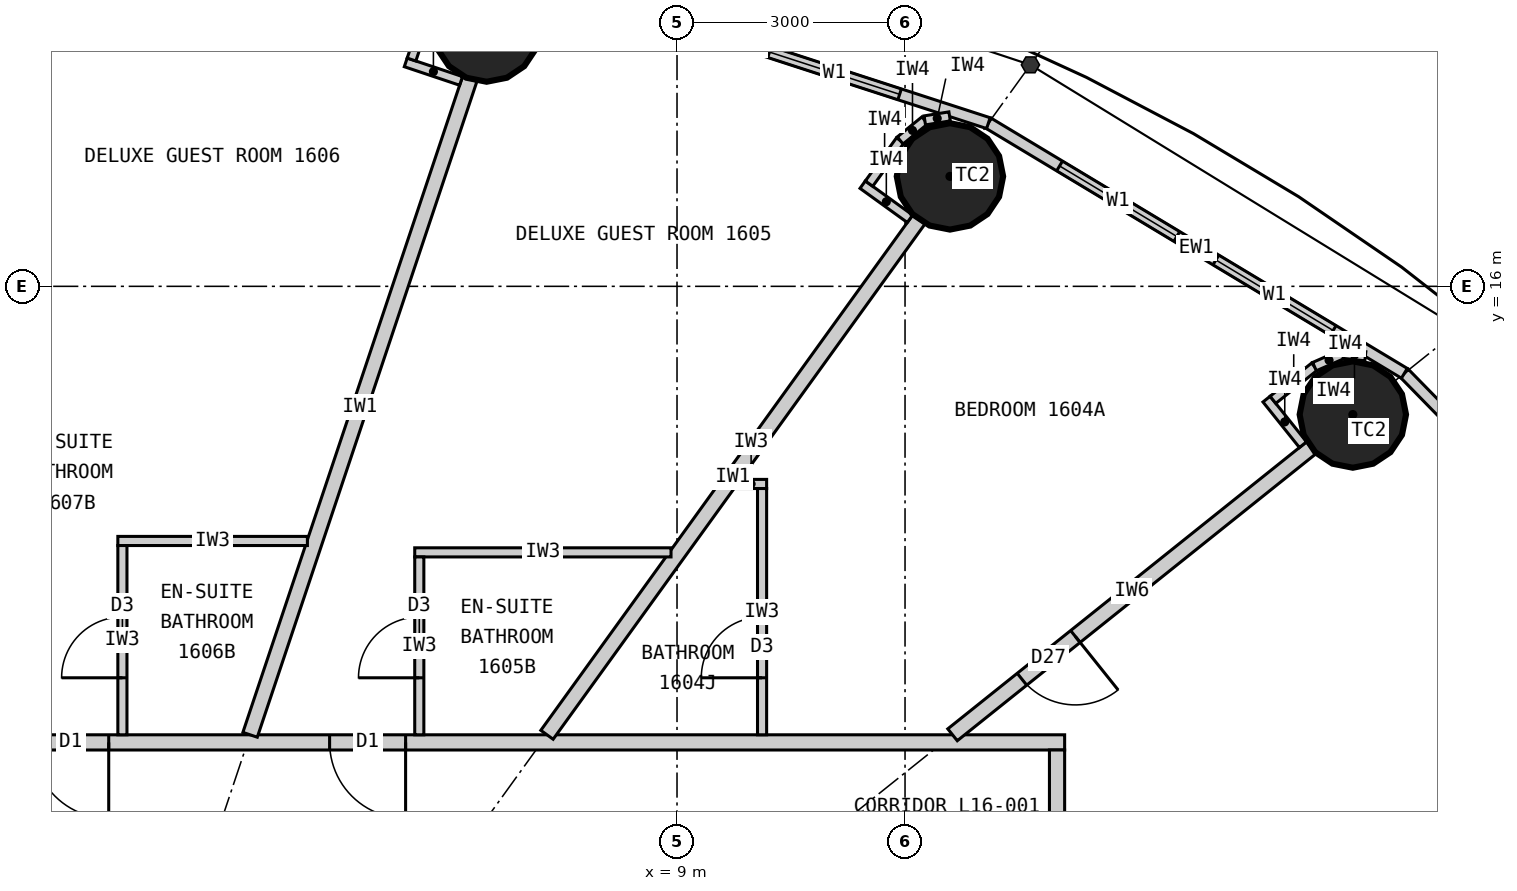
"""IFC4 building model, lengths in metres.
Left out: names, types, materials, properties, quantities, classifications, styles, units other than length and angle.
Written with IfcOpenShell. Run it as: python <this file> out.ifc"""

import sys

from ifc_helpers import new_model, si_unit, direction, frame, frame_2d, origin, origin_2d, place, context, subcontext, project, spatial, rectangle, circle, extrude, element, fill, save


model = new_model("IFC4")
c1 = context("Model", 3, precision=1e-05, world=origin(), true_north=direction((0.0, 1.0)))
c2 = subcontext(c1, "Body", "Model", "MODEL_VIEW")
j1 = project(units=[si_unit("LENGTHUNIT", "METRE"), si_unit("PLANEANGLEUNIT", "RADIAN")], contexts=[c1])
p1 = place(None, origin())
s1 = spatial("IfcSite", under=j1, at=p1, CompositionType="ELEMENT")
p2 = place(p1, origin())
s2 = spatial("IfcBuilding", under=s1, at=p2, CompositionType="ELEMENT")
p3 = place(p2, frame((0.0, 0.0, 67.2)))
s3 = spatial("IfcBuildingStorey", under=s2, at=p3, CompositionType="ELEMENT", Elevation=67.2)
for number, where, z_axis, x_axis in (
    (1, (17.892, 14.313, 0.0), (0.0, 0.0, 1.0), (1.0, 0.0, 0.0)),
    (2, (12.591, 17.447, 0.0), (0.0, 0.0, 1.0), (1.0, 0.0, 0.0)),
    (3, (6.495, 19.391, 0.0), (0.0, 0.0, 1.0), (1.0, 0.0, 0.0)),
):
    element("IfcColumn", number, at=place(p3, frame(where, z_axis=z_axis, x_axis=x_axis)), inside=s3, PredefinedType="COLUMN", context=c2, shape_type="SweptSolid", body=[
        extrude(circle(Radius=0.7, at=origin_2d()), origin(), (0.0, 0.0, 1.0), 3.3),
    ])
p4 = place(p3, frame((22.803, 10.532, 0.0), z_axis=(0.0, 0.0, 1.0), x_axis=(-0.699602905915, 0.714531856557, 0.0)))
e4 = element("IfcWall", 4, at=p4, inside=s3, PredefinedType="ELEMENTEDWALL", context=c2, shape_type="SweptSolid", body=[
    extrude(rectangle(XDim=6.051, YDim=0.15, at=frame_2d((3.025, 0.0))), origin(), (0.0, 0.0, 1.0), 3.12),
])
p5 = place(p4, frame((0.926, 0.0, 0.9)))
e5 = element("IfcOpeningElement", 5, at=p5, cuts=e4, PredefinedType="OPENING", context=c2, shape_type="SweptSolid", body=[
    extrude(rectangle(XDim=1.8, YDim=1.9, at=frame_2d((0.9, 0.95))), frame((0.0, 0.085, 0.0), z_axis=(0.0, -1.0, 0.0), x_axis=(1.0, 0.0, 0.0)), (0.0, 0.0, 1.0), 0.17),
])
p6 = place(p4, frame((3.325, 0.0, 0.9)))
e6 = element("IfcOpeningElement", 6, at=p6, cuts=e4, PredefinedType="OPENING", context=c2, shape_type="SweptSolid", body=[
    extrude(rectangle(XDim=1.8, YDim=1.9, at=frame_2d((0.9, 0.95))), frame((0.0, 0.085, 0.0), z_axis=(0.0, -1.0, 0.0), x_axis=(1.0, 0.0, 0.0)), (0.0, 0.0, 1.0), 0.17),
])
p7 = place(p3, frame((18.57, 14.856, 0.0), z_axis=(0.0, 0.0, 1.0), x_axis=(-0.856983180864, 0.515344377787, 0.0)))
e7 = element("IfcWall", 7, at=p7, inside=s3, PredefinedType="ELEMENTEDWALL", context=c2, shape_type="SweptSolid", body=[
    extrude(rectangle(XDim=6.386, YDim=0.15, at=frame_2d((3.193, 0.0))), origin(), (0.0, 0.0, 1.0), 3.12),
])
p8 = place(p7, frame((1.093, 0.0, 0.9)))
e8 = element("IfcOpeningElement", 8, at=p8, cuts=e7, PredefinedType="OPENING", context=c2, shape_type="SweptSolid", body=[
    extrude(rectangle(XDim=1.8, YDim=1.9, at=frame_2d((0.9, 0.95))), frame((0.0, 0.085, 0.0), z_axis=(0.0, -1.0, 0.0), x_axis=(1.0, 0.0, 0.0)), (0.0, 0.0, 1.0), 0.17),
])
p9 = place(p7, frame((3.493, 0.0, 0.9)))
e9 = element("IfcOpeningElement", 9, at=p9, cuts=e7, PredefinedType="OPENING", context=c2, shape_type="SweptSolid", body=[
    extrude(rectangle(XDim=1.8, YDim=1.9, at=frame_2d((0.9, 0.95))), frame((0.0, 0.085, 0.0), z_axis=(0.0, -1.0, 0.0), x_axis=(1.0, 0.0, 0.0)), (0.0, 0.0, 1.0), 0.17),
])
p10 = place(p3, frame((13.096, 18.147, 0.0), z_axis=(0.0, 0.0, 1.0), x_axis=(-0.951137534625, 0.308767534285, 0.0)))
e10 = element("IfcWall", 10, at=p10, inside=s3, PredefinedType="ELEMENTEDWALL", context=c2, shape_type="SweptSolid", body=[
    extrude(rectangle(XDim=6.655, YDim=0.15, at=frame_2d((3.328, 0.0))), origin(), (0.0, 0.0, 1.0), 3.12),
])
p11 = place(p10, frame((1.228, 0.0, 0.9)))
e11 = element("IfcOpeningElement", 11, at=p11, cuts=e10, PredefinedType="OPENING", context=c2, shape_type="SweptSolid", body=[
    extrude(rectangle(XDim=1.8, YDim=1.9, at=frame_2d((0.9, 0.95))), frame((0.0, 0.085, 0.0), z_axis=(0.0, -1.0, 0.0), x_axis=(1.0, 0.0, 0.0)), (0.0, 0.0, 1.0), 0.17),
])
p12 = place(p10, frame((3.628, 0.0, 0.9)))
e12 = element("IfcOpeningElement", 12, at=p12, cuts=e10, PredefinedType="OPENING", context=c2, shape_type="SweptSolid", body=[
    extrude(rectangle(XDim=1.8, YDim=1.9, at=frame_2d((0.9, 0.95))), frame((0.0, 0.085, 0.0), z_axis=(0.0, -1.0, 0.0), x_axis=(1.0, 0.0, 0.0)), (0.0, 0.0, 1.0), 0.17),
])
p13 = place(p3, frame((-14.1, 10.0, 0.0), z_axis=(0.0, 0.0, 1.0), x_axis=(1.0, 0.0, 0.0)))
e13 = element("IfcWall", 13, at=p13, inside=s3, PredefinedType="PARTITIONING", context=c2, shape_type="SweptSolid", body=[
    extrude(rectangle(XDim=28.2, YDim=0.2, at=frame_2d((14.1, 0.0))), origin(), (0.0, 0.0, 1.0), 3.12),
])
p14 = place(p13, frame((18.529, 0.0, 0.0)))
e14 = element("IfcOpeningElement", 14, at=p14, cuts=e13, PredefinedType="OPENING", context=c2, shape_type="SweptSolid", body=[
    extrude(rectangle(XDim=1.0, YDim=2.2, at=frame_2d((0.5, 1.1))), frame((0.0, 0.11, 0.0), z_axis=(0.0, -1.0, 0.0), x_axis=(1.0, 0.0, 0.0)), (0.0, 0.0, 1.0), 0.22),
])
p15 = place(p13, frame((14.623, 0.0, 0.0)))
e15 = element("IfcOpeningElement", 15, at=p15, cuts=e13, PredefinedType="OPENING", context=c2, shape_type="SweptSolid", body=[
    extrude(rectangle(XDim=1.0, YDim=2.2, at=frame_2d((0.5, 1.1))), frame((0.0, 0.11, 0.0), z_axis=(0.0, -1.0, 0.0), x_axis=(1.0, 0.0, 0.0)), (0.0, 0.0, 1.0), 0.22),
])
p16 = place(p13, frame((11.24, 0.0, 0.0)))
e16 = element("IfcOpeningElement", 16, at=p16, cuts=e13, PredefinedType="OPENING", context=c2, shape_type="SweptSolid", body=[
    extrude(rectangle(XDim=1.0, YDim=2.2, at=frame_2d((0.5, 1.1))), frame((0.0, 0.11, 0.0), z_axis=(0.0, -1.0, 0.0), x_axis=(1.0, 0.0, 0.0)), (0.0, 0.0, 1.0), 0.22),
])
p17 = place(p13, frame((8.671, 0.0, 0.0)))
e17 = element("IfcOpeningElement", 17, at=p17, cuts=e13, PredefinedType="OPENING", context=c2, shape_type="SweptSolid", body=[
    extrude(rectangle(XDim=1.0, YDim=2.2, at=frame_2d((0.5, 1.1))), frame((0.0, 0.11, 0.0), z_axis=(0.0, -1.0, 0.0), x_axis=(1.0, 0.0, 0.0)), (0.0, 0.0, 1.0), 0.22),
])
p18 = place(p13, frame((2.801, 0.0, 0.0)))
e18 = element("IfcOpeningElement", 18, at=p18, cuts=e13, PredefinedType="OPENING", context=c2, shape_type="SweptSolid", body=[
    extrude(rectangle(XDim=1.0, YDim=2.2, at=frame_2d((0.5, 1.1))), frame((0.0, 0.11, 0.0), z_axis=(0.0, -1.0, 0.0), x_axis=(1.0, 0.0, 0.0)), (0.0, 0.0, 1.0), 0.22),
])
p19 = place(p3, frame((14.0, -9.9, 0.0), z_axis=(0.0, 0.0, 1.0), x_axis=(0.0, 1.0, 0.0)))
e19 = element("IfcWall", 19, at=p19, inside=s3, PredefinedType="PARTITIONING", context=c2, shape_type="SweptSolid", body=[
    extrude(rectangle(XDim=19.8, YDim=0.2, at=frame_2d((9.9, 0.0))), origin(), (0.0, 0.0, 1.0), 3.12),
])
p20 = place(p19, frame((0.103, 0.0, 0.0)))
e20 = element("IfcOpeningElement", 20, at=p20, cuts=e19, PredefinedType="OPENING", context=c2, shape_type="SweptSolid", body=[
    extrude(rectangle(XDim=1.0, YDim=2.2, at=frame_2d((0.5, 1.1))), frame((0.0, 0.11, 0.0), z_axis=(0.0, -1.0, 0.0), x_axis=(1.0, 0.0, 0.0)), (0.0, 0.0, 1.0), 0.22),
])
p21 = place(p19, frame((5.248, 0.0, 0.0)))
e21 = element("IfcOpeningElement", 21, at=p21, cuts=e19, PredefinedType="OPENING", context=c2, shape_type="SweptSolid", body=[
    extrude(rectangle(XDim=1.0, YDim=2.2, at=frame_2d((0.5, 1.1))), frame((0.0, 0.11, 0.0), z_axis=(0.0, -1.0, 0.0), x_axis=(1.0, 0.0, 0.0)), (0.0, 0.0, 1.0), 0.22),
])
p22 = place(p19, frame((8.438, 0.0, 0.0)))
e22 = element("IfcOpeningElement", 22, at=p22, cuts=e19, PredefinedType="OPENING", context=c2, shape_type="SweptSolid", body=[
    extrude(rectangle(XDim=1.0, YDim=2.2, at=frame_2d((0.5, 1.1))), frame((0.0, 0.11, 0.0), z_axis=(0.0, -1.0, 0.0), x_axis=(1.0, 0.0, 0.0)), (0.0, 0.0, 1.0), 0.22),
])
p23 = place(p19, frame((14.532, 0.0, 0.0)))
e23 = element("IfcOpeningElement", 23, at=p23, cuts=e19, PredefinedType="OPENING", context=c2, shape_type="SweptSolid", body=[
    extrude(rectangle(XDim=1.0, YDim=2.2, at=frame_2d((0.5, 1.1))), frame((0.0, 0.11, 0.0), z_axis=(0.0, -1.0, 0.0), x_axis=(1.0, 0.0, 0.0)), (0.0, 0.0, 1.0), 0.22),
])
p24 = place(p3, frame((12.625, 10.1, 0.0), z_axis=(0.0, 0.0, 1.0), x_axis=(0.780892451574, 0.624665493744, 0.0)))
e24 = element("IfcWall", 24, at=p24, inside=s3, PredefinedType="PARTITIONING", context=c2, shape_type="SweptSolid", body=[
    extrude(rectangle(XDim=6.045, YDim=0.2, at=frame_2d((3.022, 0.0))), origin(), (0.0, 0.0, 1.0), 2.32),
])
p25 = place(p24, frame((1.17, 0.0, 0.0)))
e25 = element("IfcOpeningElement", 25, at=p25, cuts=e24, PredefinedType="OPENING", context=c2, shape_type="SweptSolid", body=[
    extrude(rectangle(XDim=0.9, YDim=2.1, at=frame_2d((0.45, 1.05))), frame((0.0, 0.11, 0.0), z_axis=(0.0, -1.0, 0.0), x_axis=(1.0, 0.0, 0.0)), (0.0, 0.0, 1.0), 0.22),
])
p26 = place(p3, frame((7.289, 10.1, 0.0), z_axis=(0.0, 0.0, 1.0), x_axis=(0.585198353053, 0.810890182197, 0.0)))
e26 = element("IfcWall", 26, at=p26, inside=s3, PredefinedType="PARTITIONING", context=c2, shape_type="SweptSolid", body=[
    extrude(rectangle(XDim=8.36, YDim=0.2, at=frame_2d((4.18, 0.0))), origin(), (0.0, 0.0, 1.0), 2.32),
])
p27 = place(p3, frame((3.383, 10.1, 0.0), z_axis=(0.0, 0.0, 1.0), x_axis=(0.31759592231, 0.948226149256, 0.0)))
e27 = element("IfcWall", 27, at=p27, inside=s3, PredefinedType="PARTITIONING", context=c2, shape_type="SweptSolid", body=[
    extrude(rectangle(XDim=9.098, YDim=0.2, at=frame_2d((4.549, 0.0))), origin(), (0.0, 0.0, 1.0), 2.32),
])
p28 = place(p3, frame((9.771, 13.4, 0.0), z_axis=(0.0, 0.0, 1.0), x_axis=(1.0, 0.0, 0.0)))
e28 = element("IfcWall", 28, at=p28, inside=s3, PredefinedType="PARTITIONING", context=c2, shape_type="SweptSolid", body=[
    extrude(rectangle(XDim=0.408, YDim=0.12, at=frame_2d((0.204, 0.0))), origin(), (0.0, 0.0, 1.0), 3.12),
])
p29 = place(p3, frame((10.119, 10.1, 0.0), z_axis=(0.0, 0.0, 1.0), x_axis=(0.0, 1.0, 0.0)))
e29 = element("IfcWall", 29, at=p29, inside=s3, PredefinedType="PARTITIONING", context=c2, shape_type="SweptSolid", body=[
    extrude(rectangle(XDim=3.24, YDim=0.12, at=frame_2d((1.62, 0.0))), origin(), (0.0, 0.0, 1.0), 3.12),
])
p30 = place(p29, frame((0.75, 0.0, 0.0)))
e30 = element("IfcOpeningElement", 30, at=p30, cuts=e29, PredefinedType="OPENING", context=c2, shape_type="SweptSolid", body=[
    extrude(rectangle(XDim=0.8, YDim=2.1, at=frame_2d((0.4, 1.05))), frame((0.0, 0.07, 0.0), z_axis=(0.0, -1.0, 0.0), x_axis=(1.0, 0.0, 0.0)), (0.0, 0.0, 1.0), 0.14),
])
p31 = place(p3, frame((8.921, 12.5, 0.0), z_axis=(0.0, 0.0, 1.0), x_axis=(-1.0, 0.0, 0.0)))
e31 = element("IfcWall", 31, at=p31, inside=s3, PredefinedType="PARTITIONING", context=c2, shape_type="SweptSolid", body=[
    extrude(rectangle(XDim=3.372, YDim=0.12, at=frame_2d((1.686, 0.0))), origin(), (0.0, 0.0, 1.0), 3.12),
])
p32 = place(p3, frame((5.609, 10.1, 0.0), z_axis=(0.0, 0.0, 1.0), x_axis=(0.0, 1.0, 0.0)))
e32 = element("IfcWall", 32, at=p32, inside=s3, PredefinedType="PARTITIONING", context=c2, shape_type="SweptSolid", body=[
    extrude(rectangle(XDim=2.34, YDim=0.12, at=frame_2d((1.17, 0.0))), origin(), (0.0, 0.0, 1.0), 3.12),
])
p33 = place(p32, frame((0.75, 0.0, 0.0)))
e33 = element("IfcOpeningElement", 33, at=p33, cuts=e32, PredefinedType="OPENING", context=c2, shape_type="SweptSolid", body=[
    extrude(rectangle(XDim=0.8, YDim=2.1, at=frame_2d((0.4, 1.05))), frame((0.0, 0.07, 0.0), z_axis=(0.0, -1.0, 0.0), x_axis=(1.0, 0.0, 0.0)), (0.0, 0.0, 1.0), 0.14),
])
p34 = place(p3, frame((4.137, 12.65, 0.0), z_axis=(0.0, 0.0, 1.0), x_axis=(-1.0, 0.0, 0.0)))
e34 = element("IfcWall", 34, at=p34, inside=s3, PredefinedType="PARTITIONING", context=c2, shape_type="SweptSolid", body=[
    extrude(rectangle(XDim=2.494, YDim=0.12, at=frame_2d((1.247, 0.0))), origin(), (0.0, 0.0, 1.0), 3.12),
])
p35 = place(p3, frame((1.703, 10.1, 0.0), z_axis=(0.0, 0.0, 1.0), x_axis=(0.0, 1.0, 0.0)))
e35 = element("IfcWall", 35, at=p35, inside=s3, PredefinedType="PARTITIONING", context=c2, shape_type="SweptSolid", body=[
    extrude(rectangle(XDim=2.49, YDim=0.12, at=frame_2d((1.245, 0.0))), origin(), (0.0, 0.0, 1.0), 3.12),
])
p36 = place(p35, frame((0.75, 0.0, 0.0)))
e36 = element("IfcOpeningElement", 36, at=p36, cuts=e35, PredefinedType="OPENING", context=c2, shape_type="SweptSolid", body=[
    extrude(rectangle(XDim=0.8, YDim=2.1, at=frame_2d((0.4, 1.05))), frame((0.0, 0.07, 0.0), z_axis=(0.0, -1.0, 0.0), x_axis=(1.0, 0.0, 0.0)), (0.0, 0.0, 1.0), 0.14),
])
p37 = place(p3, frame((17.236, 13.917, 0.0), z_axis=(0.0, 0.0, 1.0), x_axis=(-0.624695047554, 0.780868809443, 0.0)))
e37 = element("IfcWall", 37, at=p37, inside=s3, PredefinedType="PARTITIONING", context=c2, shape_type="SweptSolid", body=[
    extrude(rectangle(XDim=0.768, YDim=0.12, at=frame_2d((0.384, 0.0))), origin(), (0.0, 0.0, 1.0), 3.12),
])
p38 = place(p3, frame((16.841, 14.507, 0.0), z_axis=(0.0, 0.0, 1.0), x_axis=(0.780902834923, 0.62465251333, 0.0)))
e38 = element("IfcWall", 38, at=p38, inside=s3, PredefinedType="PARTITIONING", context=c2, shape_type="SweptSolid", body=[
    extrude(rectangle(XDim=0.7, YDim=0.12, at=frame_2d((0.35, 0.0))), origin(), (0.0, 0.0, 1.0), 3.12),
])
p39 = place(p3, frame((17.387, 14.944, 0.0), z_axis=(0.0, 0.0, 1.0), x_axis=(0.916036698064, 0.401094462441, 0.0)))
e39 = element("IfcWall", 39, at=p39, inside=s3, PredefinedType="PARTITIONING", context=c2, shape_type="SweptSolid", body=[
    extrude(rectangle(XDim=0.418, YDim=0.12, at=frame_2d((0.209, 0.0))), origin(), (0.0, 0.0, 1.0), 3.12),
])
p40 = place(p3, frame((17.77, 15.112, 0.0), z_axis=(0.0, 0.0, 1.0), x_axis=(0.993904401174, -0.110245368731, 0.0)))
e40 = element("IfcWall", 40, at=p40, inside=s3, PredefinedType="PARTITIONING", context=c2, shape_type="SweptSolid", body=[
    extrude(rectangle(XDim=0.288, YDim=0.12, at=frame_2d((0.144, 0.0))), origin(), (0.0, 0.0, 1.0), 3.12),
])
p41 = place(p3, frame((12.065, 16.889, 0.0), z_axis=(0.0, 0.0, 1.0), x_axis=(-0.810821798253, 0.585293098778, 0.0)))
e41 = element("IfcWall", 41, at=p41, inside=s3, PredefinedType="PARTITIONING", context=c2, shape_type="SweptSolid", body=[
    extrude(rectangle(XDim=0.768, YDim=0.12, at=frame_2d((0.384, 0.0))), origin(), (0.0, 0.0, 1.0), 3.12),
])
p42 = place(p3, frame((11.526, 17.351, 0.0), z_axis=(0.0, 0.0, 1.0), x_axis=(0.585223113993, 0.810872312296, 0.0)))
e42 = element("IfcWall", 42, at=p42, inside=s3, PredefinedType="PARTITIONING", context=c2, shape_type="SweptSolid", body=[
    extrude(rectangle(XDim=0.7, YDim=0.12, at=frame_2d((0.35, 0.0))), origin(), (0.0, 0.0, 1.0), 3.12),
])
p43 = place(p3, frame((11.936, 17.919, 0.0), z_axis=(0.0, 0.0, 1.0), x_axis=(0.775023088441, 0.631932917629, 0.0)))
e43 = element("IfcWall", 43, at=p43, inside=s3, PredefinedType="PARTITIONING", context=c2, shape_type="SweptSolid", body=[
    extrude(rectangle(XDim=0.418, YDim=0.12, at=frame_2d((0.209, 0.0))), origin(), (0.0, 0.0, 1.0), 3.12),
])
p44 = place(p3, frame((12.26, 18.183, 0.0), z_axis=(0.0, 0.0, 1.0), x_axis=(0.987218661664, 0.159371622511, 0.0)))
e44 = element("IfcWall", 44, at=p44, inside=s3, PredefinedType="PARTITIONING", context=c2, shape_type="SweptSolid", body=[
    extrude(rectangle(XDim=0.331, YDim=0.12, at=frame_2d((0.166, 0.0))), origin(), (0.0, 0.0, 1.0), 3.12),
])
p45 = place(p3, frame((6.159, 18.702, 0.0), z_axis=(0.0, 0.0, 1.0), x_axis=(-0.948173154049, 0.31775410295, 0.0)))
e45 = element("IfcWall", 45, at=p45, inside=s3, PredefinedType="PARTITIONING", context=c2, shape_type="SweptSolid", body=[
    extrude(rectangle(XDim=0.768, YDim=0.12, at=frame_2d((0.384, 0.0))), origin(), (0.0, 0.0, 1.0), 3.12),
])
p46 = place(p3, frame((5.507, 18.984, 0.0), z_axis=(0.0, 0.0, 1.0), x_axis=(0.317692050622, 0.948193946918, 0.0)))
e46 = element("IfcWall", 46, at=p46, inside=s3, PredefinedType="PARTITIONING", context=c2, shape_type="SweptSolid", body=[
    extrude(rectangle(XDim=0.7, YDim=0.12, at=frame_2d((0.35, 0.0))), origin(), (0.0, 0.0, 1.0), 3.12),
])
p47 = place(p8, origin())
e47 = element("IfcWindow", 47, at=p47, inside=s3, PartitioningType="SINGLE_PANEL", PredefinedType="WINDOW", context=c2, shape_type="SweptSolid", body=[
    extrude(rectangle(XDim=1.8, YDim=1.9, at=frame_2d((0.9, 0.95))), frame((0.0, 0.03, 0.0), z_axis=(0.0, -1.0, 0.0), x_axis=(1.0, 0.0, 0.0)), (0.0, 0.0, 1.0), 0.06),
])
fill(e8, e47)
p48 = place(p9, origin())
e48 = element("IfcWindow", 48, at=p48, inside=s3, PartitioningType="SINGLE_PANEL", PredefinedType="WINDOW", context=c2, shape_type="SweptSolid", body=[
    extrude(rectangle(XDim=1.8, YDim=1.9, at=frame_2d((0.9, 0.95))), frame((0.0, 0.03, 0.0), z_axis=(0.0, -1.0, 0.0), x_axis=(1.0, 0.0, 0.0)), (0.0, 0.0, 1.0), 0.06),
])
fill(e9, e48)
p49 = place(p11, origin())
e49 = element("IfcWindow", 49, at=p49, inside=s3, PartitioningType="SINGLE_PANEL", PredefinedType="WINDOW", context=c2, shape_type="SweptSolid", body=[
    extrude(rectangle(XDim=1.8, YDim=1.9, at=frame_2d((0.9, 0.95))), frame((0.0, 0.03, 0.0), z_axis=(0.0, -1.0, 0.0), x_axis=(1.0, 0.0, 0.0)), (0.0, 0.0, 1.0), 0.06),
])
fill(e11, e49)
p50 = place(p30, origin())
e50 = element("IfcDoor", 50, at=p50, inside=s3, OperationType="SINGLE_SWING_LEFT", PredefinedType="DOOR", context=c2, shape_type="SweptSolid", body=[
    extrude(rectangle(XDim=0.8, YDim=2.1, at=frame_2d((0.4, 1.05))), frame((0.0, 0.025, 0.0), z_axis=(0.0, -1.0, 0.0), x_axis=(1.0, 0.0, 0.0)), (0.0, 0.0, 1.0), 0.05),
])
fill(e30, e50)
p51 = place(p25, origin())
e51 = element("IfcDoor", 51, at=p51, inside=s3, OperationType="SINGLE_SWING_RIGHT", PredefinedType="DOOR", context=c2, shape_type="SweptSolid", body=[
    extrude(rectangle(XDim=0.9, YDim=2.1, at=frame_2d((0.45, 1.05))), frame((0.0, 0.025, 0.0), z_axis=(0.0, -1.0, 0.0), x_axis=(1.0, 0.0, 0.0)), (0.0, 0.0, 1.0), 0.05),
])
fill(e25, e51)
p52 = place(p33, origin())
e52 = element("IfcDoor", 52, at=p52, inside=s3, OperationType="SINGLE_SWING_LEFT", PredefinedType="DOOR", context=c2, shape_type="SweptSolid", body=[
    extrude(rectangle(XDim=0.8, YDim=2.1, at=frame_2d((0.4, 1.05))), frame((0.0, 0.025, 0.0), z_axis=(0.0, -1.0, 0.0), x_axis=(1.0, 0.0, 0.0)), (0.0, 0.0, 1.0), 0.05),
])
fill(e33, e52)
p53 = place(p14, origin())
e53 = element("IfcDoor", 53, at=p53, inside=s3, OperationType="SINGLE_SWING_RIGHT", PredefinedType="DOOR", context=c2, shape_type="SweptSolid", body=[
    extrude(rectangle(XDim=1.0, YDim=2.2, at=frame_2d((0.5, 1.1))), frame((0.0, 0.025, 0.0), z_axis=(0.0, -1.0, 0.0), x_axis=(1.0, 0.0, 0.0)), (0.0, 0.0, 1.0), 0.05),
])
fill(e14, e53)
p54 = place(p36, origin())
e54 = element("IfcDoor", 54, at=p54, inside=s3, OperationType="SINGLE_SWING_LEFT", PredefinedType="DOOR", context=c2, shape_type="SweptSolid", body=[
    extrude(rectangle(XDim=0.8, YDim=2.1, at=frame_2d((0.4, 1.05))), frame((0.0, 0.025, 0.0), z_axis=(0.0, -1.0, 0.0), x_axis=(1.0, 0.0, 0.0)), (0.0, 0.0, 1.0), 0.05),
])
fill(e36, e54)
p55 = place(p15, origin())
e55 = element("IfcDoor", 55, at=p55, inside=s3, OperationType="SINGLE_SWING_RIGHT", PredefinedType="DOOR", context=c2, shape_type="SweptSolid", body=[
    extrude(rectangle(XDim=1.0, YDim=2.2, at=frame_2d((0.5, 1.1))), frame((0.0, 0.025, 0.0), z_axis=(0.0, -1.0, 0.0), x_axis=(1.0, 0.0, 0.0)), (0.0, 0.0, 1.0), 0.05),
])
fill(e15, e55)
save(model, sys.argv[1])
